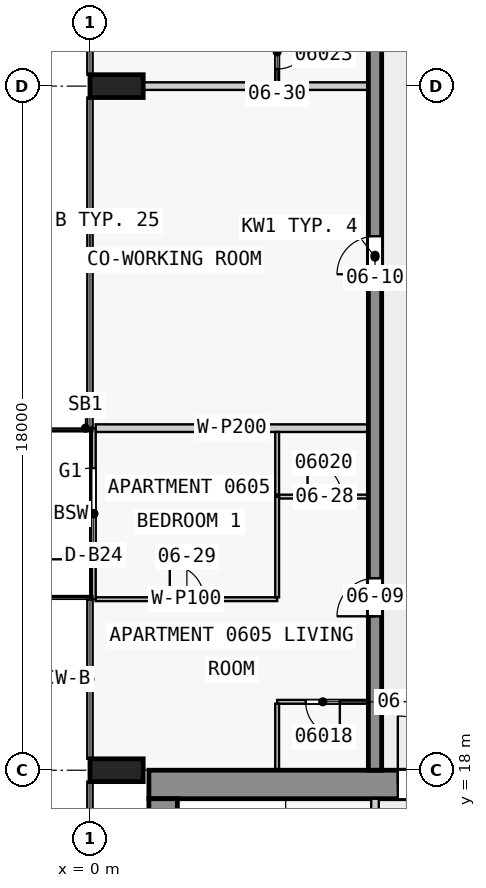
"""IFC4 building model, lengths in metres.
Left out: names, types, materials, properties, quantities, classifications, styles, units other than length and angle.
Written with IfcOpenShell. Run it as: python <this file> out.ifc"""

import sys

from ifc_helpers import new_model, si_unit, direction, frame, frame_2d, origin, origin_2d, place, context, subcontext, project, spatial, rectangle, extrude, element, fill, save


model = new_model("IFC4")
c1 = context("Model", 3, precision=1e-05, world=origin(), true_north=direction((0.0, 1.0)))
c2 = subcontext(c1, "Body", "Model", "MODEL_VIEW")
j1 = project(units=[si_unit("LENGTHUNIT", "METRE"), si_unit("PLANEANGLEUNIT", "RADIAN")], contexts=[c1])
p1 = place(None, origin())
s1 = spatial("IfcSite", under=j1, at=p1, CompositionType="ELEMENT")
p2 = place(p1, origin())
s2 = spatial("IfcBuilding", under=s1, at=p2, CompositionType="ELEMENT")
p3 = place(p2, frame((0.0, 0.0, 30.3)))
s3 = spatial("IfcBuildingStorey", under=s2, at=p3, CompositionType="ELEMENT", Elevation=30.3)
for number, where, z_axis, x_axis in (
    (1, (0.7, 36.0, 0.0), (0.0, 0.0, 1.0), (0.0, 1.0, 0.0)),
    (2, (0.7, 18.0, 0.0), (0.0, 0.0, 1.0), (0.0, 1.0, 0.0)),
):
    element("IfcColumn", number, at=place(p3, frame(where, z_axis=z_axis, x_axis=x_axis)), inside=s3, PredefinedType="COLUMN", context=c2, shape_type="SweptSolid", body=[
        extrude(rectangle(XDim=0.6, YDim=1.4, at=origin_2d()), origin(), (0.0, 0.0, 1.0), 3.5),
    ])
p4 = place(p3, frame((1.55, 17.625, 0.0), z_axis=(0.0, 0.0, 1.0), x_axis=(1.0, 0.0, 0.0)))
e3 = element("IfcWall", 3, at=p4, inside=s3, PredefinedType="SHEAR", context=c2, shape_type="SweptSolid", body=[
    extrude(rectangle(XDim=20.95, YDim=0.75, at=frame_2d((10.475, 0.0))), origin(), (0.0, 0.0, 1.0), 3.25),
])
p5 = place(p4, frame((6.55, 0.0, 0.0)))
e4 = element("IfcOpeningElement", 4, at=p5, cuts=e3, PredefinedType="OPENING", context=c2, shape_type="SweptSolid", body=[
    extrude(rectangle(XDim=1.8, YDim=2.1, at=frame_2d((0.9, 1.05))), frame((0.0, 0.385, 0.0), z_axis=(0.0, -1.0, 0.0), x_axis=(1.0, 0.0, 0.0)), (0.0, 0.0, 1.0), 0.77),
])
p6 = place(p3, frame((1.925, 2.5, 0.0), z_axis=(0.0, 0.0, 1.0), x_axis=(0.0, 1.0, 0.0)))
e5 = element("IfcWall", 5, at=p6, inside=s3, PredefinedType="SHEAR", context=c2, shape_type="SweptSolid", body=[
    extrude(rectangle(XDim=14.75, YDim=0.75, at=frame_2d((7.375, 0.0))), origin(), (0.0, 0.0, 1.0), 3.25),
])
p7 = place(p3, frame((7.5, 18.0, 0.0), z_axis=(0.0, 0.0, 1.0), x_axis=(0.0, 1.0, 0.0)))
e6 = element("IfcWall", 6, at=p7, inside=s3, PredefinedType="SHEAR", context=c2, shape_type="SweptSolid", body=[
    extrude(rectangle(XDim=27.0, YDim=0.35, at=frame_2d((13.5, 0.0))), origin(), (0.0, 0.0, 1.0), 3.25),
])
p8 = place(p7, frame((4.05, 0.0, 0.0)))
e7 = element("IfcOpeningElement", 7, at=p8, cuts=e6, PredefinedType="OPENING", context=c2, shape_type="SweptSolid", body=[
    extrude(rectangle(XDim=1.0, YDim=2.1, at=frame_2d((0.5, 1.05))), frame((0.0, 0.185, 0.0), z_axis=(0.0, -1.0, 0.0), x_axis=(1.0, 0.0, 0.0)), (0.0, 0.0, 1.0), 0.37),
])
p9 = place(p7, frame((13.05, 0.0, 0.0)))
e8 = element("IfcOpeningElement", 8, at=p9, cuts=e6, PredefinedType="OPENING", context=c2, shape_type="SweptSolid", body=[
    extrude(rectangle(XDim=1.0, YDim=2.1, at=frame_2d((0.5, 1.05))), frame((0.0, 0.185, 0.0), z_axis=(0.0, -1.0, 0.0), x_axis=(1.0, 0.0, 0.0)), (0.0, 0.0, 1.0), 0.37),
])
p10 = place(p7, frame((21.35, 0.0, 0.0)))
e9 = element("IfcOpeningElement", 9, at=p10, cuts=e6, PredefinedType="OPENING", context=c2, shape_type="SweptSolid", body=[
    extrude(rectangle(XDim=1.0, YDim=2.1, at=frame_2d((0.5, 1.05))), frame((0.0, 0.185, 0.0), z_axis=(0.0, -1.0, 0.0), x_axis=(1.0, 0.0, 0.0)), (0.0, 0.0, 1.0), 0.37),
])
p11 = place(p3, frame((0.1, 22.5, 0.0), z_axis=(0.0, 0.0, 1.0), x_axis=(0.0, 1.0, 0.0)))
e10 = element("IfcWall", 10, at=p11, inside=s3, PredefinedType="STANDARD", context=c2, shape_type="SweptSolid", body=[
    extrude(rectangle(XDim=4.5, YDim=0.1, at=frame_2d((2.25, 0.0))), origin(), (0.0, 0.0, 1.0), 3.25),
])
p12 = place(p11, frame((1.05, 0.0, 0.0)))
e11 = element("IfcOpeningElement", 11, at=p12, cuts=e10, PredefinedType="OPENING", context=c2, shape_type="SweptSolid", body=[
    extrude(rectangle(XDim=2.4, YDim=2.4, at=frame_2d((1.2, 1.2))), frame((0.0, 0.06, 0.0), z_axis=(0.0, -1.0, 0.0), x_axis=(1.0, 0.0, 0.0)), (0.0, 0.0, 1.0), 0.12),
])
p13 = place(p3, frame((7.5, 10.1, 0.0), z_axis=(0.0, 0.0, 1.0), x_axis=(0.0, 1.0, 0.0)))
e12 = element("IfcWall", 12, at=p13, inside=s3, PredefinedType="PARTITIONING", context=c2, shape_type="SweptSolid", body=[
    extrude(rectangle(XDim=7.15, YDim=0.2, at=frame_2d((3.575, 0.0))), origin(), (0.0, 0.0, 1.0), 3.25),
])
p14 = place(p13, frame((1.05, 0.0, 0.0)))
e13 = element("IfcOpeningElement", 13, at=p14, cuts=e12, PredefinedType="OPENING", context=c2, shape_type="SweptSolid", body=[
    extrude(rectangle(XDim=0.9, YDim=2.1, at=frame_2d((0.45, 1.05))), frame((0.0, 0.11, 0.0), z_axis=(0.0, -1.0, 0.0), x_axis=(1.0, 0.0, 0.0)), (0.0, 0.0, 1.0), 0.22),
])
p15 = place(p13, frame((4.625, 0.0, 0.0)))
e14 = element("IfcOpeningElement", 14, at=p15, cuts=e12, PredefinedType="OPENING", context=c2, shape_type="SweptSolid", body=[
    extrude(rectangle(XDim=0.9, YDim=2.1, at=frame_2d((0.45, 1.05))), frame((0.0, 0.11, 0.0), z_axis=(0.0, -1.0, 0.0), x_axis=(1.0, 0.0, 0.0)), (0.0, 0.0, 1.0), 0.22),
])
p16 = place(p3, frame((7.325, 19.8, 0.0), z_axis=(0.0, 0.0, 1.0), x_axis=(-1.0, 0.0, 0.0)))
e15 = element("IfcWall", 15, at=p16, inside=s3, PredefinedType="PARTITIONING", context=c2, shape_type="SweptSolid", body=[
    extrude(rectangle(XDim=2.4, YDim=0.1, at=frame_2d((1.2, 0.0))), origin(), (0.0, 0.0, 1.0), 3.25),
])
p17 = place(p16, frame((0.75, 0.0, 0.0)))
e16 = element("IfcOpeningElement", 16, at=p17, cuts=e15, PredefinedType="OPENING", context=c2, shape_type="SweptSolid", body=[
    extrude(rectangle(XDim=0.9, YDim=2.1, at=frame_2d((0.45, 1.05))), frame((0.0, 0.06, 0.0), z_axis=(0.0, -1.0, 0.0), x_axis=(1.0, 0.0, 0.0)), (0.0, 0.0, 1.0), 0.12),
])
p18 = place(p3, frame((0.15, 22.5, 0.0), z_axis=(0.0, 0.0, 1.0), x_axis=(1.0, 0.0, 0.0)))
e17 = element("IfcWall", 17, at=p18, inside=s3, PredefinedType="PARTITIONING", context=c2, shape_type="SweptSolid", body=[
    extrude(rectangle(XDim=4.775, YDim=0.1, at=frame_2d((2.388, 0.0))), origin(), (0.0, 0.0, 1.0), 3.25),
])
p19 = place(p18, frame((1.95, 0.0, 0.0)))
e18 = element("IfcOpeningElement", 18, at=p19, cuts=e17, PredefinedType="OPENING", context=c2, shape_type="SweptSolid", body=[
    extrude(rectangle(XDim=0.9, YDim=2.1, at=frame_2d((0.45, 1.05))), frame((0.0, 0.06, 0.0), z_axis=(0.0, -1.0, 0.0), x_axis=(1.0, 0.0, 0.0)), (0.0, 0.0, 1.0), 0.12),
])
p20 = place(p3, frame((4.975, 25.2, 0.0), z_axis=(0.0, 0.0, 1.0), x_axis=(1.0, 0.0, 0.0)))
e19 = element("IfcWall", 19, at=p20, inside=s3, PredefinedType="PARTITIONING", context=c2, shape_type="SweptSolid", body=[
    extrude(rectangle(XDim=2.35, YDim=0.1, at=frame_2d((1.175, 0.0))), origin(), (0.0, 0.0, 1.0), 3.25),
])
p21 = place(p20, frame((0.75, 0.0, 0.0)))
e20 = element("IfcOpeningElement", 20, at=p21, cuts=e19, PredefinedType="OPENING", context=c2, shape_type="SweptSolid", body=[
    extrude(rectangle(XDim=0.9, YDim=2.1, at=frame_2d((0.45, 1.05))), frame((0.0, 0.06, 0.0), z_axis=(0.0, -1.0, 0.0), x_axis=(1.0, 0.0, 0.0)), (0.0, 0.0, 1.0), 0.12),
])
p22 = place(p3, frame((7.325, 27.0, 0.0), z_axis=(0.0, 0.0, 1.0), x_axis=(-1.0, 0.0, 0.0)))
e21 = element("IfcWall", 21, at=p22, inside=s3, PredefinedType="PARTITIONING", context=c2, shape_type="SweptSolid", body=[
    extrude(rectangle(XDim=7.175, YDim=0.2, at=frame_2d((3.587, 0.0))), origin(), (0.0, 0.0, 1.0), 3.25),
])
p23 = place(p3, frame((7.325, 36.0, 0.0), z_axis=(0.0, 0.0, 1.0), x_axis=(-1.0, 0.0, 0.0)))
e22 = element("IfcWall", 22, at=p23, inside=s3, PredefinedType="PARTITIONING", context=c2, shape_type="SweptSolid", body=[
    extrude(rectangle(XDim=5.925, YDim=0.2, at=frame_2d((2.962, 0.0))), origin(), (0.0, 0.0, 1.0), 3.25),
])
p24 = place(p3, frame((4.925, 19.75, 0.0), z_axis=(0.0, 0.0, 1.0), x_axis=(0.0, -1.0, 0.0)))
e23 = element("IfcWall", 23, at=p24, inside=s3, PredefinedType="PARTITIONING", context=c2, shape_type="SweptSolid", body=[
    extrude(rectangle(XDim=1.75, YDim=0.1, at=frame_2d((0.875, 0.0))), origin(), (0.0, 0.0, 1.0), 3.25),
])
p25 = place(p3, frame((4.925, 26.9, 0.0), z_axis=(0.0, 0.0, 1.0), x_axis=(0.0, -1.0, 0.0)))
e24 = element("IfcWall", 24, at=p25, inside=s3, PredefinedType="PARTITIONING", context=c2, shape_type="SweptSolid", body=[
    extrude(rectangle(XDim=1.65, YDim=0.1, at=frame_2d((0.825, 0.0))), origin(), (0.0, 0.0, 1.0), 3.25),
])
p26 = place(p3, frame((4.925, 39.1, 0.0), z_axis=(0.0, 0.0, 1.0), x_axis=(0.0, -1.0, 0.0)))
e25 = element("IfcWall", 25, at=p26, inside=s3, PredefinedType="PARTITIONING", context=c2, shape_type="SweptSolid", body=[
    extrude(rectangle(XDim=3.0, YDim=0.1, at=frame_2d((1.5, 0.0))), origin(), (0.0, 0.0, 1.0), 3.25),
])
p27 = place(p26, frame((1.75, 0.0, 0.0)))
e26 = element("IfcOpeningElement", 26, at=p27, cuts=e25, PredefinedType="OPENING", context=c2, shape_type="SweptSolid", body=[
    extrude(rectangle(XDim=0.9, YDim=2.1, at=frame_2d((0.45, 1.05))), frame((0.0, 0.06, 0.0), z_axis=(0.0, -1.0, 0.0), x_axis=(1.0, 0.0, 0.0)), (0.0, 0.0, 1.0), 0.12),
])
p28 = place(p3, frame((4.925, 22.55, 0.0), z_axis=(0.0, 0.0, 1.0), x_axis=(0.0, 1.0, 0.0)))
e27 = element("IfcWall", 27, at=p28, inside=s3, PredefinedType="PARTITIONING", context=c2, shape_type="SweptSolid", body=[
    extrude(rectangle(XDim=2.65, YDim=0.1, at=frame_2d((1.325, 0.0))), origin(), (0.0, 0.0, 1.0), 3.25),
])
p29 = place(p12, origin())
e28 = element("IfcDoor", 28, at=p29, inside=s3, OperationType="SINGLE_SWING_LEFT", PredefinedType="DOOR", context=c2, shape_type="SweptSolid", body=[
    extrude(rectangle(XDim=2.4, YDim=2.4, at=frame_2d((1.2, 1.2))), frame((0.0, 0.025, 0.0), z_axis=(0.0, -1.0, 0.0), x_axis=(1.0, 0.0, 0.0)), (0.0, 0.0, 1.0), 0.05),
])
fill(e11, e28)
p30 = place(p5, origin())
e29 = element("IfcDoor", 29, at=p30, inside=s3, OperationType="DOUBLE_DOOR_SINGLE_SWING", PredefinedType="DOOR", context=c2, shape_type="SweptSolid", body=[
    extrude(rectangle(XDim=1.8, YDim=2.1, at=frame_2d((0.9, 1.05))), frame((0.0, 0.025, 0.0), z_axis=(0.0, -1.0, 0.0), x_axis=(1.0, 0.0, 0.0)), (0.0, 0.0, 1.0), 0.05),
])
fill(e4, e29)
p31 = place(p8, origin())
e30 = element("IfcDoor", 30, at=p31, inside=s3, OperationType="SINGLE_SWING_LEFT", PredefinedType="DOOR", context=c2, shape_type="SweptSolid", body=[
    extrude(rectangle(XDim=1.0, YDim=2.1, at=frame_2d((0.5, 1.05))), frame((0.0, 0.025, 0.0), z_axis=(0.0, -1.0, 0.0), x_axis=(1.0, 0.0, 0.0)), (0.0, 0.0, 1.0), 0.05),
])
fill(e7, e30)
p32 = place(p9, origin())
e31 = element("IfcDoor", 31, at=p32, inside=s3, OperationType="SINGLE_SWING_RIGHT", PredefinedType="DOOR", context=c2, shape_type="SweptSolid", body=[
    extrude(rectangle(XDim=1.0, YDim=2.1, at=frame_2d((0.5, 1.05))), frame((0.0, 0.025, 0.0), z_axis=(0.0, -1.0, 0.0), x_axis=(1.0, 0.0, 0.0)), (0.0, 0.0, 1.0), 0.05),
])
fill(e8, e31)
p33 = place(p17, origin())
e32 = element("IfcDoor", 32, at=p33, inside=s3, OperationType="SINGLE_SWING_LEFT", PredefinedType="DOOR", context=c2, shape_type="SweptSolid", body=[
    extrude(rectangle(XDim=0.9, YDim=2.1, at=frame_2d((0.45, 1.05))), frame((0.0, 0.025, 0.0), z_axis=(0.0, -1.0, 0.0), x_axis=(1.0, 0.0, 0.0)), (0.0, 0.0, 1.0), 0.05),
])
fill(e16, e32)
p34 = place(p21, origin())
e33 = element("IfcDoor", 33, at=p34, inside=s3, OperationType="SINGLE_SWING_RIGHT", PredefinedType="DOOR", context=c2, shape_type="SweptSolid", body=[
    extrude(rectangle(XDim=0.9, YDim=2.1, at=frame_2d((0.45, 1.05))), frame((0.0, 0.025, 0.0), z_axis=(0.0, -1.0, 0.0), x_axis=(1.0, 0.0, 0.0)), (0.0, 0.0, 1.0), 0.05),
])
fill(e20, e33)
p35 = place(p19, origin())
e34 = element("IfcDoor", 34, at=p35, inside=s3, OperationType="SINGLE_SWING_RIGHT", PredefinedType="DOOR", context=c2, shape_type="SweptSolid", body=[
    extrude(rectangle(XDim=0.9, YDim=2.1, at=frame_2d((0.45, 1.05))), frame((0.0, 0.025, 0.0), z_axis=(0.0, -1.0, 0.0), x_axis=(1.0, 0.0, 0.0)), (0.0, 0.0, 1.0), 0.05),
])
fill(e18, e34)
p36 = place(p27, origin())
e35 = element("IfcDoor", 35, at=p36, inside=s3, OperationType="SINGLE_SWING_RIGHT", PredefinedType="DOOR", context=c2, shape_type="SweptSolid", body=[
    extrude(rectangle(XDim=0.9, YDim=2.1, at=frame_2d((0.45, 1.05))), frame((0.0, 0.025, 0.0), z_axis=(0.0, -1.0, 0.0), x_axis=(1.0, 0.0, 0.0)), (0.0, 0.0, 1.0), 0.05),
])
fill(e26, e35)
save(model, sys.argv[1])
